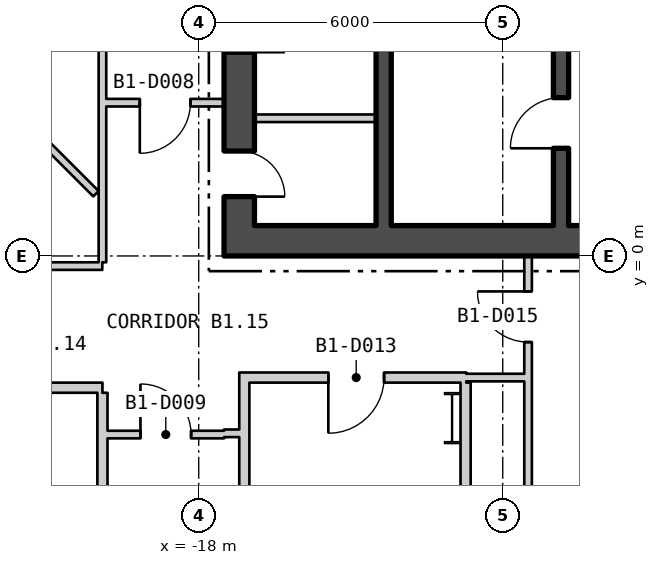
"""IFC4 building model, lengths in metres.
Left out: names, types, materials, properties, quantities, classifications, styles, units other than length and angle.
Written with IfcOpenShell. Run it as: python <this file> out.ifc"""

import sys

from ifc_helpers import new_model, si_unit, direction, frame, frame_2d, origin, origin_2d, place, context, subcontext, project, spatial, rectangle, i_section, extrude, element, fill, save


model = new_model("IFC4")
c1 = context("Model", 3, precision=1e-05, world=origin(), true_north=direction((0.0, 1.0)))
c2 = subcontext(c1, "Body", "Model", "MODEL_VIEW")
j1 = project(units=[si_unit("LENGTHUNIT", "METRE"), si_unit("PLANEANGLEUNIT", "RADIAN")], contexts=[c1])
p1 = place(None, origin())
s1 = spatial("IfcSite", under=j1, at=p1, CompositionType="ELEMENT")
p2 = place(p1, origin())
s2 = spatial("IfcBuilding", under=s1, at=p2, CompositionType="ELEMENT")
p3 = place(p2, frame((0.0, 0.0, -5.7)))
s3 = spatial("IfcBuildingStorey", under=s2, at=p3, CompositionType="ELEMENT", Elevation=-5.7)
p4 = place(p3, frame((-13.0, -3.2, 0.0), z_axis=(0.0, 0.0, 1.0), x_axis=(1.0, 0.0, 0.0)))
e1 = element("IfcColumn", 1, at=p4, inside=s3, PredefinedType="COLUMN", context=c2, shape_type="SweptSolid", body=[
    extrude(i_section(OverallWidth=0.302, OverallDepth=1.008, WebThickness=0.021, FlangeThickness=0.04, at=origin_2d()), origin(), (0.0, 0.0, 1.0), 5.7),
])
p5 = place(p3, frame((-17.5, 0.3, 0.0), z_axis=(0.0, 0.0, 1.0), x_axis=(1.0, 0.0, 0.0)))
e2 = element("IfcWall", 2, at=p5, inside=s3, PredefinedType="SHEAR", context=c2, shape_type="SweptSolid", body=[
    extrude(rectangle(XDim=35.0, YDim=0.6, at=frame_2d((17.5, 0.0))), origin(), (0.0, 0.0, 1.0), 5.25),
])
p6 = place(p5, frame((12.0, 0.0, 0.0)))
e3 = element("IfcOpeningElement", 3, at=p6, cuts=e2, PredefinedType="OPENING", context=c2, shape_type="SweptSolid", body=[
    extrude(rectangle(XDim=1.8, YDim=2.4, at=frame_2d((0.9, 1.2))), frame((0.0, 0.31, 0.0), z_axis=(0.0, -1.0, 0.0), x_axis=(1.0, 0.0, 0.0)), (0.0, 0.0, 1.0), 0.62),
])
p7 = place(p5, frame((22.0, 0.0, 0.0)))
e4 = element("IfcOpeningElement", 4, at=p7, cuts=e2, PredefinedType="OPENING", context=c2, shape_type="SweptSolid", body=[
    extrude(rectangle(XDim=1.8, YDim=2.4, at=frame_2d((0.9, 1.2))), frame((0.0, 0.31, 0.0), z_axis=(0.0, -1.0, 0.0), x_axis=(1.0, 0.0, 0.0)), (0.0, 0.0, 1.0), 0.62),
])
p8 = place(p3, frame((-17.2, 0.6, 0.0), z_axis=(0.0, 0.0, 1.0), x_axis=(0.0, 1.0, 0.0)))
e5 = element("IfcWall", 5, at=p8, inside=s3, PredefinedType="SHEAR", context=c2, shape_type="SweptSolid", body=[
    extrude(rectangle(XDim=16.8, YDim=0.6, at=frame_2d((8.4, 0.0))), origin(), (0.0, 0.0, 1.0), 5.25),
])
p9 = place(p8, frame((5.7, 0.0, 0.0)))
e6 = element("IfcOpeningElement", 6, at=p9, cuts=e5, PredefinedType="OPENING", context=c2, shape_type="SweptSolid", body=[
    extrude(rectangle(XDim=1.5, YDim=2.1, at=frame_2d((0.75, 1.05))), frame((0.0, 0.31, 0.0), z_axis=(0.0, -1.0, 0.0), x_axis=(1.0, 0.0, 0.0)), (0.0, 0.0, 1.0), 0.62),
])
p10 = place(p8, frame((0.571, 0.0, 0.0)))
e7 = element("IfcOpeningElement", 7, at=p10, cuts=e5, PredefinedType="OPENING", context=c2, shape_type="SweptSolid", body=[
    extrude(rectangle(XDim=0.9, YDim=2.1, at=frame_2d((0.45, 1.05))), frame((0.0, 0.31, 0.0), z_axis=(0.0, -1.0, 0.0), x_axis=(1.0, 0.0, 0.0)), (0.0, 0.0, 1.0), 0.62),
])
p11 = place(p8, frame((3.421, 0.0, 0.0)))
e8 = element("IfcOpeningElement", 8, at=p11, cuts=e5, PredefinedType="OPENING", context=c2, shape_type="SweptSolid", body=[
    extrude(rectangle(XDim=0.9, YDim=2.1, at=frame_2d((0.45, 1.05))), frame((0.0, 0.31, 0.0), z_axis=(0.0, -1.0, 0.0), x_axis=(1.0, 0.0, 0.0)), (0.0, 0.0, 1.0), 0.62),
])
p12 = place(p8, frame((9.473, 0.0, 0.0)))
e9 = element("IfcOpeningElement", 9, at=p12, cuts=e5, PredefinedType="OPENING", context=c2, shape_type="SweptSolid", body=[
    extrude(rectangle(XDim=1.0, YDim=2.1, at=frame_2d((0.5, 1.05))), frame((0.0, 0.31, 0.0), z_axis=(0.0, -1.0, 0.0), x_axis=(1.0, 0.0, 0.0)), (0.0, 0.0, 1.0), 0.62),
])
p13 = place(p8, frame((14.323, 0.0, 0.0)))
e10 = element("IfcOpeningElement", 10, at=p13, cuts=e5, PredefinedType="OPENING", context=c2, shape_type="SweptSolid", body=[
    extrude(rectangle(XDim=0.9, YDim=2.1, at=frame_2d((0.45, 1.05))), frame((0.0, 0.31, 0.0), z_axis=(0.0, -1.0, 0.0), x_axis=(1.0, 0.0, 0.0)), (0.0, 0.0, 1.0), 0.62),
])
p14 = place(p3, frame((-10.85, 0.6, 0.0), z_axis=(0.0, 0.0, 1.0), x_axis=(0.0, 1.0, 0.0)))
e11 = element("IfcWall", 11, at=p14, inside=s3, PredefinedType="SHEAR", context=c2, shape_type="SweptSolid", body=[
    extrude(rectangle(XDim=16.8, YDim=0.3, at=frame_2d((8.4, 0.0))), origin(), (0.0, 0.0, 1.0), 5.25),
])
p15 = place(p14, frame((5.075, 0.0, 0.0)))
e12 = element("IfcOpeningElement", 12, at=p15, cuts=e11, PredefinedType="OPENING", context=c2, shape_type="SweptSolid", body=[
    extrude(rectangle(XDim=1.25, YDim=2.1, at=frame_2d((0.625, 1.05))), frame((0.0, 0.16, 0.0), z_axis=(0.0, -1.0, 0.0), x_axis=(1.0, 0.0, 0.0)), (0.0, 0.0, 1.0), 0.32),
])
p16 = place(p14, frame((1.525, 0.0, 0.0)))
e13 = element("IfcOpeningElement", 13, at=p16, cuts=e11, PredefinedType="OPENING", context=c2, shape_type="SweptSolid", body=[
    extrude(rectangle(XDim=1.0, YDim=2.1, at=frame_2d((0.5, 1.05))), frame((0.0, 0.16, 0.0), z_axis=(0.0, -1.0, 0.0), x_axis=(1.0, 0.0, 0.0)), (0.0, 0.0, 1.0), 0.32),
])
p17 = place(p3, frame((-14.35, 0.6, 0.0), z_axis=(0.0, 0.0, 1.0), x_axis=(0.0, 1.0, 0.0)))
e14 = element("IfcWall", 14, at=p17, inside=s3, PredefinedType="SHEAR", context=c2, shape_type="SweptSolid", body=[
    extrude(rectangle(XDim=16.8, YDim=0.3, at=frame_2d((8.4, 0.0))), origin(), (0.0, 0.0, 1.0), 5.25),
])
p18 = place(p17, frame((5.7, 0.0, 0.0)))
e15 = element("IfcOpeningElement", 15, at=p18, cuts=e14, PredefinedType="OPENING", context=c2, shape_type="SweptSolid", body=[
    extrude(rectangle(XDim=1.5, YDim=2.1, at=frame_2d((0.75, 1.05))), frame((0.0, 0.16, 0.0), z_axis=(0.0, -1.0, 0.0), x_axis=(1.0, 0.0, 0.0)), (0.0, 0.0, 1.0), 0.32),
])
p19 = place(p3, frame((-16.9, 2.718, 0.0), z_axis=(0.0, 0.0, 1.0), x_axis=(1.0, 0.0, 0.0)))
e16 = element("IfcWall", 16, at=p19, inside=s3, PredefinedType="PARTITIONING", context=c2, shape_type="SweptSolid", body=[
    extrude(rectangle(XDim=2.4, YDim=0.15, at=frame_2d((1.2, 0.0))), origin(), (0.0, 0.0, 1.0), 5.25),
])
p20 = place(p3, frame((-26.75, -0.2, 0.0), z_axis=(0.0, 0.0, 1.0), x_axis=(1.0, 0.0, 0.0)))
e17 = element("IfcWall", 17, at=p20, inside=s3, PredefinedType="PARTITIONING", context=c2, shape_type="SweptSolid", body=[
    extrude(rectangle(XDim=6.847, YDim=0.15, at=frame_2d((3.424, 0.0))), origin(), (0.0, 0.0, 1.0), 5.25),
])
p21 = place(p20, frame((3.983, 0.0, 0.0)))
e18 = element("IfcOpeningElement", 18, at=p21, cuts=e17, PredefinedType="OPENING", context=c2, shape_type="SweptSolid", body=[
    extrude(rectangle(XDim=1.0, YDim=2.1, at=frame_2d((0.5, 1.05))), frame((0.0, 0.085, 0.0), z_axis=(0.0, -1.0, 0.0), x_axis=(1.0, 0.0, 0.0)), (0.0, 0.0, 1.0), 0.17),
])
p22 = place(p3, frame((-25.392, 6.592, 0.0), z_axis=(0.0, 0.0, 1.0), x_axis=(0.707106781187, -0.707106781187, 0.0)))
e19 = element("IfcWall", 19, at=p22, inside=s3, PredefinedType="PARTITIONING", context=c2, shape_type="SweptSolid", body=[
    extrude(rectangle(XDim=7.586, YDim=0.15, at=frame_2d((3.793, 0.0))), origin(), (0.0, 0.0, 1.0), 5.25),
])
p23 = place(p3, frame((-24.725, -2.6, 0.0), z_axis=(0.0, 0.0, 1.0), x_axis=(1.0, 0.0, 0.0)))
e20 = element("IfcWall", 20, at=p23, inside=s3, PredefinedType="PARTITIONING", context=c2, shape_type="SweptSolid", body=[
    extrude(rectangle(XDim=4.825, YDim=0.2, at=frame_2d((2.413, 0.0))), origin(), (0.0, 0.0, 1.0), 5.25),
])
p24 = place(p23, frame((1.862, 0.0, 0.0)))
e21 = element("IfcOpeningElement", 21, at=p24, cuts=e20, PredefinedType="OPENING", context=c2, shape_type="SweptSolid", body=[
    extrude(rectangle(XDim=1.1, YDim=2.1, at=frame_2d((0.55, 1.05))), frame((0.0, 0.11, 0.0), z_axis=(0.0, -1.0, 0.0), x_axis=(1.0, 0.0, 0.0)), (0.0, 0.0, 1.0), 0.22),
])
p25 = place(p3, frame((-19.9, -6.7, 0.0), z_axis=(0.0, 0.0, 1.0), x_axis=(0.0, 1.0, 0.0)))
e22 = element("IfcWall", 22, at=p25, inside=s3, PredefinedType="PARTITIONING", context=c2, shape_type="SweptSolid", body=[
    extrude(rectangle(XDim=4.0, YDim=0.2, at=frame_2d((2.0, 0.0))), origin(), (0.0, 0.0, 1.0), 5.25),
])
p26 = place(p3, frame((-19.9, -0.125, 0.0), z_axis=(0.0, 0.0, 1.0), x_axis=(0.0, 1.0, 0.0)))
e23 = element("IfcWall", 23, at=p26, inside=s3, PredefinedType="PARTITIONING", context=c2, shape_type="SweptSolid", body=[
    extrude(rectangle(XDim=1.15, YDim=0.15, at=frame_2d((0.575, 0.0))), origin(), (0.0, 0.0, 1.0), 5.25),
])
p27 = place(p3, frame((-19.9, 1.025, 0.0), z_axis=(0.0, 0.0, 1.0), x_axis=(0.0, 1.0, 0.0)))
e24 = element("IfcWall", 24, at=p27, inside=s3, PredefinedType="PARTITIONING", context=c2, shape_type="SweptSolid", body=[
    extrude(rectangle(XDim=16.9, YDim=0.15, at=frame_2d((8.45, 0.0))), origin(), (0.0, 0.0, 1.0), 5.25),
])
p28 = place(p27, frame((8.244, 0.0, 0.0)))
e25 = element("IfcOpeningElement", 25, at=p28, cuts=e24, PredefinedType="OPENING", context=c2, shape_type="SweptSolid", body=[
    extrude(rectangle(XDim=1.8, YDim=2.1, at=frame_2d((0.9, 1.05))), frame((0.0, 0.085, 0.0), z_axis=(0.0, -1.0, 0.0), x_axis=(1.0, 0.0, 0.0)), (0.0, 0.0, 1.0), 0.17),
])
p29 = place(p3, frame((-19.825, 3.025, 0.0), z_axis=(0.0, 0.0, 1.0), x_axis=(1.0, 0.0, 0.0)))
e26 = element("IfcWall", 26, at=p29, inside=s3, PredefinedType="PARTITIONING", context=c2, shape_type="SweptSolid", body=[
    extrude(rectangle(XDim=2.325, YDim=0.15, at=frame_2d((1.163, 0.0))), origin(), (0.0, 0.0, 1.0), 5.25),
])
p30 = place(p29, frame((0.662, 0.0, 0.0)))
e27 = element("IfcOpeningElement", 27, at=p30, cuts=e26, PredefinedType="OPENING", context=c2, shape_type="SweptSolid", body=[
    extrude(rectangle(XDim=1.0, YDim=2.1, at=frame_2d((0.5, 1.05))), frame((0.0, 0.085, 0.0), z_axis=(0.0, -1.0, 0.0), x_axis=(1.0, 0.0, 0.0)), (0.0, 0.0, 1.0), 0.17),
])
p31 = place(p3, frame((-19.8, -3.525, 0.0), z_axis=(0.0, 0.0, 1.0), x_axis=(1.0, 0.0, 0.0)))
e28 = element("IfcWall", 28, at=p31, inside=s3, PredefinedType="PARTITIONING", context=c2, shape_type="SweptSolid", body=[
    extrude(rectangle(XDim=2.3, YDim=0.15, at=frame_2d((1.15, 0.0))), origin(), (0.0, 0.0, 1.0), 5.25),
])
p32 = place(p31, frame((0.65, 0.0, 0.0)))
e29 = element("IfcOpeningElement", 29, at=p32, cuts=e28, PredefinedType="OPENING", context=c2, shape_type="SweptSolid", body=[
    extrude(rectangle(XDim=1.0, YDim=2.1, at=frame_2d((0.5, 1.05))), frame((0.0, 0.085, 0.0), z_axis=(0.0, -1.0, 0.0), x_axis=(1.0, 0.0, 0.0)), (0.0, 0.0, 1.0), 0.17),
])
p33 = place(p3, frame((-17.5, -3.5, 0.0), z_axis=(0.0, 0.0, 1.0), x_axis=(1.0, 0.0, 0.0)))
e30 = element("IfcWall", 30, at=p33, inside=s3, PredefinedType="PARTITIONING", context=c2, shape_type="SweptSolid", body=[
    extrude(rectangle(XDim=0.3, YDim=0.15, at=frame_2d((0.15, 0.0))), origin(), (0.0, 0.0, 1.0), 5.25),
])
p34 = place(p3, frame((-17.1, -6.699, 0.0), z_axis=(0.0, 0.0, 1.0), x_axis=(0.0, 1.0, 0.0)))
e31 = element("IfcWall", 31, at=p34, inside=s3, PredefinedType="PARTITIONING", context=c2, shape_type="SweptSolid", body=[
    extrude(rectangle(XDim=4.399, YDim=0.2, at=frame_2d((2.2, 0.0))), origin(), (0.0, 0.0, 1.0), 5.25),
])
p35 = place(p3, frame((-17.0, -2.4, 0.0), z_axis=(0.0, 0.0, 1.0), x_axis=(1.0, 0.0, 0.0)))
e32 = element("IfcWall", 32, at=p35, inside=s3, PredefinedType="PARTITIONING", context=c2, shape_type="SweptSolid", body=[
    extrude(rectangle(XDim=4.279, YDim=0.2, at=frame_2d((2.139, 0.0))), origin(), (0.0, 0.0, 1.0), 5.25),
])
p36 = place(p35, frame((1.558, 0.0, 0.0)))
e33 = element("IfcOpeningElement", 33, at=p36, cuts=e32, PredefinedType="OPENING", context=c2, shape_type="SweptSolid", body=[
    extrude(rectangle(XDim=1.1, YDim=2.1, at=frame_2d((0.55, 1.05))), frame((0.0, 0.11, 0.0), z_axis=(0.0, -1.0, 0.0), x_axis=(1.0, 0.0, 0.0)), (0.0, 0.0, 1.0), 0.22),
])
p37 = place(p3, frame((-12.733, -6.167, 0.0), z_axis=(0.0, 0.0, 1.0), x_axis=(0.0, 1.0, 0.0)))
e34 = element("IfcWall", 34, at=p37, inside=s3, PredefinedType="PARTITIONING", context=c2, shape_type="SweptSolid", body=[
    extrude(rectangle(XDim=3.667, YDim=0.2, at=frame_2d((1.833, 0.0))), origin(), (0.0, 0.0, 1.0), 5.25),
])
p38 = place(p3, frame((-12.721, -2.4, 0.0), z_axis=(0.0, 0.0, 1.0), x_axis=(1.0, 0.0, 0.0)))
e35 = element("IfcWall", 35, at=p38, inside=s3, PredefinedType="PARTITIONING", context=c2, shape_type="SweptSolid", body=[
    extrude(rectangle(XDim=1.146, YDim=0.15, at=frame_2d((0.573, 0.0))), origin(), (0.0, 0.0, 1.0), 5.25),
])
p39 = place(p3, frame((-11.5, -6.075, 0.0), z_axis=(0.0, 0.0, 1.0), x_axis=(0.0, 1.0, 0.0)))
e36 = element("IfcWall", 36, at=p39, inside=s3, PredefinedType="PARTITIONING", context=c2, shape_type="SweptSolid", body=[
    extrude(rectangle(XDim=6.075, YDim=0.15, at=frame_2d((3.038, 0.0))), origin(), (0.0, 0.0, 1.0), 5.25),
])
p40 = place(p39, frame((4.375, 0.0, 0.0)))
e37 = element("IfcOpeningElement", 37, at=p40, cuts=e36, PredefinedType="OPENING", context=c2, shape_type="SweptSolid", body=[
    extrude(rectangle(XDim=1.0, YDim=2.1, at=frame_2d((0.5, 1.05))), frame((0.0, 0.085, 0.0), z_axis=(0.0, -1.0, 0.0), x_axis=(1.0, 0.0, 0.0)), (0.0, 0.0, 1.0), 0.17),
])
p41 = place(p16, origin())
e38 = element("IfcDoor", 38, at=p41, inside=s3, OperationType="SINGLE_SWING_RIGHT", PredefinedType="DOOR", context=c2, shape_type="SweptSolid", body=[
    extrude(rectangle(XDim=1.0, YDim=2.1, at=frame_2d((0.5, 1.05))), frame((0.0, 0.025, 0.0), z_axis=(0.0, -1.0, 0.0), x_axis=(1.0, 0.0, 0.0)), (0.0, 0.0, 1.0), 0.05),
])
fill(e13, e38)
p42 = place(p10, origin())
e39 = element("IfcDoor", 39, at=p42, inside=s3, OperationType="SINGLE_SWING_LEFT", PredefinedType="DOOR", context=c2, shape_type="SweptSolid", body=[
    extrude(rectangle(XDim=0.9, YDim=2.1, at=frame_2d((0.45, 1.05))), frame((0.0, 0.025, 0.0), z_axis=(0.0, -1.0, 0.0), x_axis=(1.0, 0.0, 0.0)), (0.0, 0.0, 1.0), 0.05),
])
fill(e7, e39)
p43 = place(p11, origin())
e40 = element("IfcDoor", 40, at=p43, inside=s3, OperationType="SINGLE_SWING_LEFT", PredefinedType="DOOR", context=c2, shape_type="SweptSolid", body=[
    extrude(rectangle(XDim=0.9, YDim=2.1, at=frame_2d((0.45, 1.05))), frame((0.0, 0.025, 0.0), z_axis=(0.0, -1.0, 0.0), x_axis=(1.0, 0.0, 0.0)), (0.0, 0.0, 1.0), 0.05),
])
fill(e8, e40)
p44 = place(p30, origin())
e41 = element("IfcDoor", 41, at=p44, inside=s3, OperationType="SINGLE_SWING_LEFT", PredefinedType="DOOR", context=c2, shape_type="SweptSolid", body=[
    extrude(rectangle(XDim=1.0, YDim=2.1, at=frame_2d((0.5, 1.05))), frame((0.0, 0.025, 0.0), z_axis=(0.0, -1.0, 0.0), x_axis=(1.0, 0.0, 0.0)), (0.0, 0.0, 1.0), 0.05),
])
fill(e27, e41)
p45 = place(p32, origin())
e42 = element("IfcDoor", 42, at=p45, inside=s3, OperationType="SINGLE_SWING_RIGHT", PredefinedType="DOOR", context=c2, shape_type="SweptSolid", body=[
    extrude(rectangle(XDim=1.0, YDim=2.1, at=frame_2d((0.5, 1.05))), frame((0.0, 0.025, 0.0), z_axis=(0.0, -1.0, 0.0), x_axis=(1.0, 0.0, 0.0)), (0.0, 0.0, 1.0), 0.05),
])
fill(e29, e42)
p46 = place(p36, origin())
e43 = element("IfcDoor", 43, at=p46, inside=s3, OperationType="SINGLE_SWING_LEFT", PredefinedType="DOOR", context=c2, shape_type="SweptSolid", body=[
    extrude(rectangle(XDim=1.1, YDim=2.1, at=frame_2d((0.55, 1.05))), frame((0.0, 0.025, 0.0), z_axis=(0.0, -1.0, 0.0), x_axis=(1.0, 0.0, 0.0)), (0.0, 0.0, 1.0), 0.05),
])
fill(e33, e43)
p47 = place(p40, origin())
e44 = element("IfcDoor", 44, at=p47, inside=s3, OperationType="SINGLE_SWING_LEFT", PredefinedType="DOOR", context=c2, shape_type="SweptSolid", body=[
    extrude(rectangle(XDim=1.0, YDim=2.1, at=frame_2d((0.5, 1.05))), frame((0.0, 0.025, 0.0), z_axis=(0.0, -1.0, 0.0), x_axis=(1.0, 0.0, 0.0)), (0.0, 0.0, 1.0), 0.05),
])
fill(e37, e44)
save(model, sys.argv[1])
